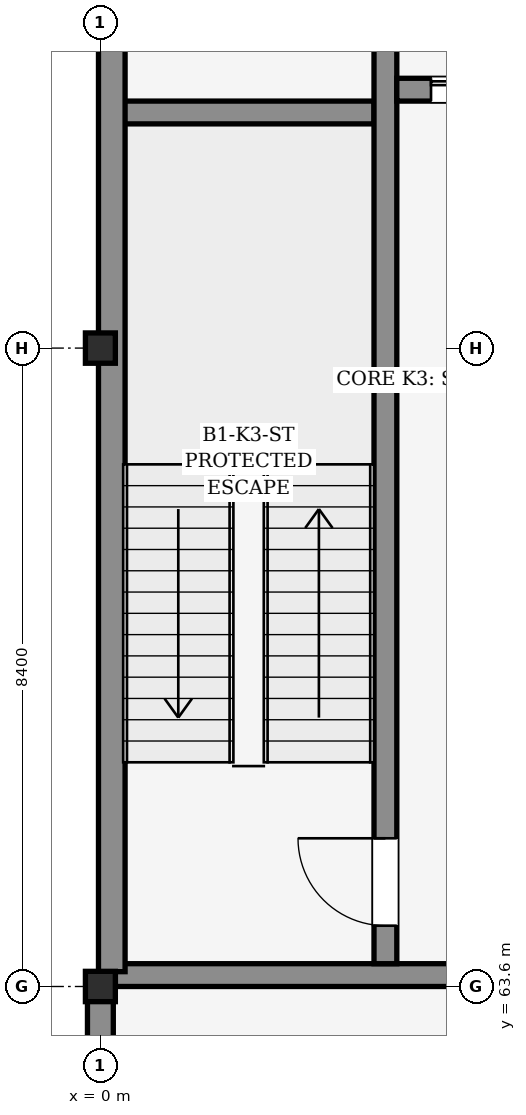
"""IFC4 building model, lengths in metres.
Left out: names, types, materials, properties, quantities, classifications, styles, units other than length and angle.
Written with IfcOpenShell. Run it as: python <this file> out.ifc"""

import sys

from ifc_helpers import new_model, si_unit, direction, frame, frame_2d, origin, origin_2d, place, context, subcontext, project, spatial, rectangle, i_section, extrude, element, fill, save


model = new_model("IFC4")
c1 = context("Model", 3, precision=1e-05, world=origin(), true_north=direction((0.0, 1.0)))
c2 = subcontext(c1, "Body", "Model", "MODEL_VIEW")
j1 = project(units=[si_unit("LENGTHUNIT", "METRE"), si_unit("PLANEANGLEUNIT", "RADIAN")], contexts=[c1])
p1 = place(None, origin())
s1 = spatial("IfcSite", under=j1, at=p1, CompositionType="ELEMENT")
p2 = place(p1, origin())
s2 = spatial("IfcBuilding", under=s1, at=p2, CompositionType="ELEMENT")
p3 = place(p2, frame((0.0, 0.0, -5.4)))
s3 = spatial("IfcBuildingStorey", under=s2, at=p3, CompositionType="ELEMENT", Elevation=-5.4)
for number, where, z_axis, x_axis in (
    (1, (0.0, 63.6, 0.0), (0.0, 0.0, 1.0), (1.0, 0.0, 0.0)),
    (2, (0.0, 72.0, 0.0), (0.0, 0.0, 1.0), (1.0, 0.0, 0.0)),
):
    element("IfcColumn", number, at=place(p3, frame(where, z_axis=z_axis, x_axis=x_axis)), inside=s3, PredefinedType="COLUMN", context=c2, shape_type="SweptSolid", body=[
        extrude(i_section(OverallWidth=0.399, OverallDepth=0.394, WebThickness=0.023, FlangeThickness=0.037, FilletRadius=0.015, at=origin_2d()), origin(), (0.0, 0.0, 1.0), 5.4),
    ])
p4 = place(p3, frame((0.0, 55.395, 0.0), z_axis=(0.0, 0.0, 1.0), x_axis=(0.0, 1.0, 0.0)))
e3 = element("IfcWall", 3, at=p4, inside=s3, PredefinedType="USERDEFINED", context=c2, shape_type="SweptSolid", body=[
    extrude(rectangle(XDim=8.01, YDim=0.34, at=frame_2d((4.005, 0.0))), origin(), (0.0, 0.0, 1.0), 4.06),
])
p5 = place(p3, frame((0.198, 63.75, 0.0), z_axis=(0.0, 0.0, 1.0), x_axis=(1.0, 0.0, 0.0)))
e4 = element("IfcWall", 4, at=p5, inside=s3, PredefinedType="SHEAR", context=c2, shape_type="SweptSolid", body=[
    extrude(rectangle(XDim=8.005, YDim=0.3, at=frame_2d((4.002, 0.0))), origin(), (0.0, 0.0, 1.0), 5.12),
])
p6 = place(p3, frame((0.3, 75.1, 0.0), z_axis=(0.0, 0.0, 1.0), x_axis=(1.0, 0.0, 0.0)))
e5 = element("IfcWall", 5, at=p6, inside=s3, PredefinedType="SHEAR", context=c2, shape_type="SweptSolid", body=[
    extrude(rectangle(XDim=3.3, YDim=0.3, at=frame_2d((1.65, 0.0))), origin(), (0.0, 0.0, 1.0), 5.12),
])
p7 = place(p3, frame((0.15, 63.795, 0.0), z_axis=(0.0, 0.0, 1.0), x_axis=(0.0, 1.0, 0.0)))
e6 = element("IfcWall", 6, at=p7, inside=s3, PredefinedType="SHEAR", context=c2, shape_type="SweptSolid", body=[
    extrude(rectangle(XDim=16.41, YDim=0.35, at=frame_2d((8.205, 0.0))), origin(), (0.0, 0.0, 1.0), 5.12),
])
p8 = place(p3, frame((3.75, 63.9, 0.0), z_axis=(0.0, 0.0, 1.0), x_axis=(0.0, 1.0, 0.0)))
e7 = element("IfcWall", 7, at=p8, inside=s3, PredefinedType="SHEAR", context=c2, shape_type="SweptSolid", body=[
    extrude(rectangle(XDim=16.2, YDim=0.3, at=frame_2d((8.1, 0.0))), origin(), (0.0, 0.0, 1.0), 5.12),
])
p9 = place(p8, frame((0.5, 0.0, 0.0)))
e8 = element("IfcOpeningElement", 8, at=p9, cuts=e7, PredefinedType="OPENING", context=c2, shape_type="SweptSolid", body=[
    extrude(rectangle(XDim=1.15, YDim=2.15, at=frame_2d((0.575, 1.075))), frame((0.0, 0.16, 0.0), z_axis=(0.0, -1.0, 0.0), x_axis=(1.0, 0.0, 0.0)), (0.0, 0.0, 1.0), 0.32),
])
p10 = place(p3, frame((3.9, 75.4, 0.0), z_axis=(0.0, 0.0, 1.0), x_axis=(1.0, 0.0, 0.0)))
e9 = element("IfcWall", 9, at=p10, inside=s3, PredefinedType="SHEAR", context=c2, shape_type="SweptSolid", body=[
    extrude(rectangle(XDim=2.2, YDim=0.3, at=frame_2d((1.1, 0.0))), origin(), (0.0, 0.0, 1.0), 5.12),
])
p11 = place(p10, frame((0.45, 0.0, 0.0)))
e10 = element("IfcOpeningElement", 10, at=p11, cuts=e9, PredefinedType="OPENING", context=c2, shape_type="SweptSolid", body=[
    extrude(rectangle(XDim=1.1, YDim=2.2, at=frame_2d((0.55, 1.1))), frame((0.0, 0.16, 0.0), z_axis=(0.0, -1.0, 0.0), x_axis=(1.0, 0.0, 0.0)), (0.0, 0.0, 1.0), 0.32),
])
p12 = place(p9, frame((1.15, 0.0, 0.0), z_axis=(0.0, 0.0, 1.0), x_axis=(-1.0, 0.0, 0.0)))
e11 = element("IfcDoor", 11, at=p12, inside=s3, OperationType="SINGLE_SWING_LEFT", PredefinedType="DOOR", context=c2, shape_type="SweptSolid", body=[
    extrude(rectangle(XDim=1.15, YDim=2.15, at=frame_2d((0.575, 1.075))), frame((0.0, 0.025, 0.0), z_axis=(0.0, -1.0, 0.0), x_axis=(1.0, 0.0, 0.0)), (0.0, 0.0, 1.0), 0.05),
])
fill(e8, e11)
p13 = place(p11, origin())
e12 = element("IfcDoor", 12, at=p13, inside=s3, OperationType="SLIDING_TO_LEFT", PredefinedType="DOOR", context=c2, shape_type="SweptSolid", body=[
    extrude(rectangle(XDim=1.1, YDim=2.2, at=frame_2d((0.55, 1.1))), frame((0.0, 0.025, 0.0), z_axis=(0.0, -1.0, 0.0), x_axis=(1.0, 0.0, 0.0)), (0.0, 0.0, 1.0), 0.05),
])
fill(e10, e12)
save(model, sys.argv[1])
